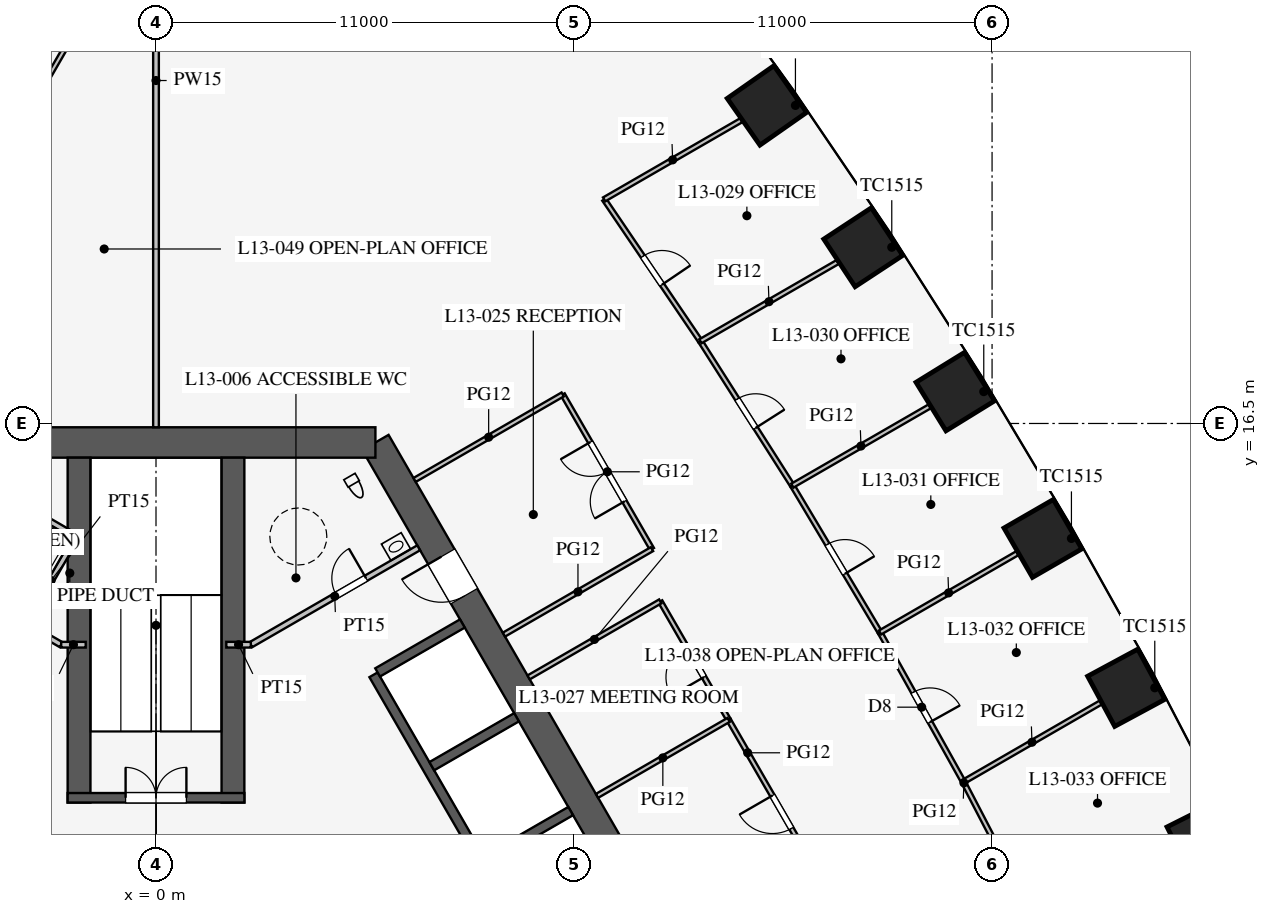
"""IFC4 building model, lengths in metres.
Left out: names, types, materials, properties, quantities, classifications, styles, units other than length and angle.
Written with IfcOpenShell. Run it as: python <this file> out.ifc"""

import sys

from ifc_helpers import new_model, si_unit, direction, frame, frame_2d, origin, origin_2d, place, context, subcontext, project, spatial, rectangle, extrude, element, fill, save


model = new_model("IFC4")
c1 = context("Model", 3, precision=1e-05, world=origin(), true_north=direction((0.0, 1.0)))
c2 = subcontext(c1, "Body", "Model", "MODEL_VIEW")
j1 = project(units=[si_unit("LENGTHUNIT", "METRE"), si_unit("PLANEANGLEUNIT", "RADIAN")], contexts=[c1])
p1 = place(None, origin())
s1 = spatial("IfcSite", under=j1, at=p1, CompositionType="ELEMENT")
p2 = place(p1, origin())
s2 = spatial("IfcBuilding", under=s1, at=p2, CompositionType="ELEMENT")
p3 = place(p2, frame((0.0, 0.0, 58.5)))
s3 = spatial("IfcBuildingStorey", under=s2, at=p3, CompositionType="ELEMENT", Elevation=58.5)
for number, where, z_axis, x_axis in (
    (1, (27.611, 5.549, 0.0), (0.0, 0.0, 1.0), (-0.449, 0.894, 0.0)),
    (2, (25.531, 9.544, 0.0), (0.0, 0.0, 1.0), (-0.475, 0.88, 0.0)),
    (3, (23.338, 13.474, 0.0), (0.0, 0.0, 1.0), (-0.5, 0.866, 0.0)),
    (4, (21.031, 17.339, 0.0), (0.0, 0.0, 1.0), (-0.525, 0.851, 0.0)),
    (5, (18.611, 21.137, 0.0), (0.0, 0.0, 1.0), (-0.549, 0.836, 0.0)),
    (6, (16.076, 24.87, 0.0), (0.0, 0.0, 1.0), (-0.574, 0.819, 0.0)),
):
    element("IfcColumn", number, at=place(p3, frame(where, z_axis=z_axis, x_axis=x_axis)), inside=s3, PredefinedType="COLUMN", context=c2, shape_type="SweptSolid", body=[
        extrude(rectangle(XDim=1.5, YDim=1.5, at=origin_2d()), origin(), (0.0, 0.0, 1.0), 4.2),
    ])
p4 = place(p3, frame((16.743, -3.0, 0.0), z_axis=(0.0, 0.0, 1.0), x_axis=(-0.500002442456, 0.866023993627, 0.0)))
e7 = element("IfcWall", 7, at=p4, inside=s3, PredefinedType="SHEAR", context=c2, shape_type="SweptSolid", body=[
    extrude(rectangle(XDim=21.939, YDim=0.8, at=frame_2d((10.97, 0.0))), origin(), (0.0, 0.0, 1.0), 4.2),
])
p5 = place(p4, frame((17.27, 0.0, 0.0)))
e8 = element("IfcOpeningElement", 8, at=p5, cuts=e7, PredefinedType="OPENING", context=c2, shape_type="SweptSolid", body=[
    extrude(rectangle(XDim=1.2, YDim=2.1, at=frame_2d((0.6, 1.05))), frame((0.0, 0.41, 0.0), z_axis=(0.0, -1.0, 0.0), x_axis=(1.0, 0.0, 0.0)), (0.0, 0.0, 1.0), 0.82),
])
p6 = place(p4, frame((3.47, 0.0, 0.0)))
e9 = element("IfcOpeningElement", 9, at=p6, cuts=e7, PredefinedType="OPENING", context=c2, shape_type="SweptSolid", body=[
    extrude(rectangle(XDim=1.2, YDim=2.1, at=frame_2d((0.6, 1.05))), frame((0.0, 0.41, 0.0), z_axis=(0.0, -1.0, 0.0), x_axis=(1.0, 0.0, 0.0)), (0.0, 0.0, 1.0), 0.82),
])
p7 = place(p3, frame((5.773, 16.0, 0.0), z_axis=(0.0, 0.0, 1.0), x_axis=(-1.0, 0.0, 0.0)))
e10 = element("IfcWall", 10, at=p7, inside=s3, PredefinedType="SHEAR", context=c2, shape_type="SweptSolid", body=[
    extrude(rectangle(XDim=11.547, YDim=0.8, at=frame_2d((5.773, 0.0))), origin(), (0.0, 0.0, 1.0), 4.2),
])
p8 = place(p3, frame((11.424, 0.014, 0.0), z_axis=(0.0, 0.0, 1.0), x_axis=(-0.500001763848, 0.866024385424, 0.0)))
e11 = element("IfcWall", 11, at=p8, inside=s3, PredefinedType="SHEAR", context=c2, shape_type="SweptSolid", body=[
    extrude(rectangle(XDim=11.4, YDim=0.25, at=frame_2d((5.7, 0.0))), origin(), (0.0, 0.0, 1.0), 4.2),
])
for number, where, z_axis, x_axis in (
    (12, (8.682, 5.012, 0.0), (0.0, 0.0, 1.0), (0.866, 0.5, 0.0)),
    (13, (7.257, 7.481, 0.0), (0.0, 0.0, 1.0), (0.866, 0.5, 0.0)),
):
    element("IfcWall", number, at=place(p3, frame(where, z_axis=z_axis, x_axis=x_axis)), inside=s3, PredefinedType="SHEAR", context=c2, shape_type="SweptSolid", body=[
        extrude(rectangle(XDim=2.575, YDim=0.25, at=frame_2d((1.288, 0.0))), origin(), (0.0, 0.0, 1.0), 4.2),
    ])
p9 = place(p3, frame((5.832, 9.949, 0.0), z_axis=(0.0, 0.0, 1.0), x_axis=(0.866029291668, 0.499993265928, 0.0)))
e14 = element("IfcWall", 14, at=p9, inside=s3, PredefinedType="SHEAR", context=c2, shape_type="SweptSolid", body=[
    extrude(rectangle(XDim=2.575, YDim=0.25, at=frame_2d((1.288, 0.0))), origin(), (0.0, 0.0, 1.0), 4.2),
])
for number, where, z_axis, x_axis in (
    (15, (2.025, 6.525, 0.0), (0.0, 0.0, 1.0), (0.0, 1.0, 0.0)),
    (16, (-2.025, 6.525, 0.0), (0.0, 0.0, 1.0), (0.0, 1.0, 0.0)),
):
    element("IfcWall", number, at=place(p3, frame(where, z_axis=z_axis, x_axis=x_axis)), inside=s3, PredefinedType="SHEAR", context=c2, shape_type="SweptSolid", body=[
        extrude(rectangle(XDim=9.075, YDim=0.6, at=frame_2d((4.538, 0.0))), origin(), (0.0, 0.0, 1.0), 4.2),
    ])
p10 = place(p3, frame((2.325, 6.65, 0.0), z_axis=(0.0, 0.0, 1.0), x_axis=(-1.0, 0.0, 0.0)))
e17 = element("IfcWall", 17, at=p10, inside=s3, PredefinedType="SHEAR", context=c2, shape_type="SweptSolid", body=[
    extrude(rectangle(XDim=4.65, YDim=0.25, at=frame_2d((2.325, 0.0))), origin(), (0.0, 0.0, 1.0), 4.2),
])
p11 = place(p10, frame((1.525, 0.0, 0.0)))
e18 = element("IfcOpeningElement", 18, at=p11, cuts=e17, PredefinedType="OPENING", context=c2, shape_type="SweptSolid", body=[
    extrude(rectangle(XDim=1.6, YDim=2.1, at=frame_2d((0.8, 1.05))), frame((0.0, 0.135, 0.0), z_axis=(0.0, -1.0, 0.0), x_axis=(1.0, 0.0, 0.0)), (0.0, 0.0, 1.0), 0.27),
])
p12 = place(p3, frame((2.495, 10.678, 0.0), z_axis=(0.0, 0.0, 1.0), x_axis=(0.86602216432, 0.500005610874, 0.0)))
e19 = element("IfcWall", 19, at=p12, inside=s3, PredefinedType="PARTITIONING", context=c2, shape_type="SweptSolid", body=[
    extrude(rectangle(XDim=5.1, YDim=0.15, at=frame_2d((2.55, 0.0))), origin(), (0.0, 0.0, 1.0), 4.0),
])
p13 = place(p12, frame((2.6, 0.0, 0.0)))
e20 = element("IfcOpeningElement", 20, at=p13, cuts=e19, PredefinedType="OPENING", context=c2, shape_type="SweptSolid", body=[
    extrude(rectangle(XDim=0.9, YDim=2.1, at=frame_2d((0.45, 1.05))), frame((0.0, 0.085, 0.0), z_axis=(0.0, -1.0, 0.0), x_axis=(1.0, 0.0, 0.0)), (0.0, 0.0, 1.0), 0.17),
])
p14 = place(p3, frame((-2.495, 10.678, 0.0), z_axis=(0.0, 0.0, 1.0), x_axis=(-0.86602216432, 0.500005610874, 0.0)))
e21 = element("IfcWall", 21, at=p14, inside=s3, PredefinedType="PARTITIONING", context=c2, shape_type="SweptSolid", body=[
    extrude(rectangle(XDim=5.1, YDim=0.15, at=frame_2d((2.55, 0.0))), origin(), (0.0, 0.0, 1.0), 4.0),
])
p15 = place(p14, frame((2.6, 0.0, 0.0)))
e22 = element("IfcOpeningElement", 22, at=p15, cuts=e21, PredefinedType="OPENING", context=c2, shape_type="SweptSolid", body=[
    extrude(rectangle(XDim=0.9, YDim=2.1, at=frame_2d((0.45, 1.05))), frame((0.0, 0.085, 0.0), z_axis=(0.0, -1.0, 0.0), x_axis=(1.0, 0.0, 0.0)), (0.0, 0.0, 1.0), 0.17),
])
for number, where, z_axis, x_axis in (
    (23, (2.495, 10.678, 0.0), (0.0, 0.0, 1.0), (-1.0, 0.0, 0.0)),
    (24, (-2.495, 10.678, 0.0), (0.0, 0.0, 1.0), (1.0, 0.0, 0.0)),
):
    element("IfcWall", number, at=place(p3, frame(where, z_axis=z_axis, x_axis=x_axis)), inside=s3, PredefinedType="PARTITIONING", context=c2, shape_type="SweptSolid", body=[
        extrude(rectangle(XDim=0.645, YDim=0.15, at=frame_2d((0.323, 0.0))), origin(), (0.0, 0.0, 1.0), 4.0),
    ])
p16 = place(p3, frame((-2.031, 13.482, 0.0), z_axis=(0.0, 0.0, 1.0), x_axis=(-0.866050731258, 0.499956128963, 0.0)))
e25 = element("IfcWall", 25, at=p16, inside=s3, PredefinedType="PARTITIONING", context=c2, shape_type="SweptSolid", body=[
    extrude(rectangle(XDim=4.1, YDim=0.15, at=frame_2d((2.05, 0.0))), origin(), (0.0, 0.0, 1.0), 4.0),
])
p17 = place(p3, frame((-3.389, 11.281, 0.0), z_axis=(0.0, 0.0, 1.0), x_axis=(0.499989096993, 0.866031698547, 0.0)))
e26 = element("IfcWall", 26, at=p17, inside=s3, PredefinedType="PARTITIONING", context=c2, shape_type="SweptSolid", body=[
    extrude(rectangle(XDim=2.51, YDim=0.15, at=frame_2d((1.255, 0.0))), origin(), (0.0, 0.0, 1.0), 4.0),
])
p18 = place(p3, frame((0.0, 16.4, 0.0), z_axis=(0.0, 0.0, 1.0), x_axis=(0.0, 1.0, 0.0)))
e27 = element("IfcWall", 27, at=p18, inside=s3, PredefinedType="PARTITIONING", context=c2, shape_type="SweptSolid", body=[
    extrude(rectangle(XDim=18.25, YDim=0.15, at=frame_2d((9.125, 0.0))), origin(), (0.0, 0.0, 1.0), 2.3),
])
p19 = place(p3, frame((13.052, 13.194, 0.0), z_axis=(0.0, 0.0, 1.0), x_axis=(-0.499977259774, 0.866038532462, 0.0)))
e28 = element("IfcWall", 28, at=p19, inside=s3, PredefinedType="PARTITIONING", context=c2, shape_type="SweptSolid", body=[
    extrude(rectangle(XDim=4.7, YDim=0.12, at=frame_2d((2.35, 0.0))), origin(), (0.0, 0.0, 1.0), 2.9),
])
p20 = place(p19, frame((1.45, 0.0, 0.15)))
e29 = element("IfcOpeningElement", 29, at=p20, cuts=e28, PredefinedType="OPENING", context=c2, shape_type="SweptSolid", body=[
    extrude(rectangle(XDim=1.8, YDim=2.1, at=frame_2d((0.9, 1.05))), frame((0.0, 0.07, 0.0), z_axis=(0.0, -1.0, 0.0), x_axis=(1.0, 0.0, 0.0)), (0.0, 0.0, 1.0), 0.14),
])
p21 = place(p3, frame((15.069, 8.7, 0.0), z_axis=(0.0, 0.0, 1.0), x_axis=(-0.500012057535, 0.866018442252, 0.0)))
e30 = element("IfcWall", 30, at=p21, inside=s3, PredefinedType="PARTITIONING", context=c2, shape_type="SweptSolid", body=[
    extrude(rectangle(XDim=3.6, YDim=0.12, at=frame_2d((1.8, 0.0))), origin(), (0.0, 0.0, 1.0), 2.9),
])
p22 = place(p21, frame((1.3, 0.0, 0.15)))
e31 = element("IfcOpeningElement", 31, at=p22, cuts=e30, PredefinedType="OPENING", context=c2, shape_type="SweptSolid", body=[
    extrude(rectangle(XDim=1.0, YDim=2.1, at=frame_2d((0.5, 1.05))), frame((0.0, 0.07, 0.0), z_axis=(0.0, -1.0, 0.0), x_axis=(1.0, 0.0, 0.0)), (0.0, 0.0, 1.0), 0.14),
])
p23 = place(p3, frame((17.869, 3.85, 0.0), z_axis=(0.0, 0.0, 1.0), x_axis=(-0.500016814911, 0.866015695474, 0.0)))
e32 = element("IfcWall", 32, at=p23, inside=s3, PredefinedType="PARTITIONING", context=c2, shape_type="SweptSolid", body=[
    extrude(rectangle(XDim=5.6, YDim=0.12, at=frame_2d((2.8, 0.0))), origin(), (0.0, 0.0, 1.0), 2.9),
])
p24 = place(p23, frame((2.3, 0.0, 0.15)))
e33 = element("IfcOpeningElement", 33, at=p24, cuts=e32, PredefinedType="OPENING", context=c2, shape_type="SweptSolid", body=[
    extrude(rectangle(XDim=1.0, YDim=2.1, at=frame_2d((0.5, 1.05))), frame((0.0, 0.07, 0.0), z_axis=(0.0, -1.0, 0.0), x_axis=(1.0, 0.0, 0.0)), (0.0, 0.0, 1.0), 0.14),
])
p25 = place(p3, frame((9.805, 9.818, 0.0), z_axis=(0.0, 0.0, 1.0), x_axis=(0.866026010844, 0.49999894854, 0.0)))
e34 = element("IfcWall", 34, at=p25, inside=s3, PredefinedType="PARTITIONING", context=c2, shape_type="SweptSolid", body=[
    extrude(rectangle(XDim=4.0, YDim=0.12, at=frame_2d((2.0, 0.0))), origin(), (0.0, 0.0, 1.0), 2.9),
])
p26 = place(p3, frame((9.155, 10.944, 0.0), z_axis=(0.0, 0.0, 1.0), x_axis=(0.866017533419, 0.500013631625, 0.0)))
e35 = element("IfcWall", 35, at=p26, inside=s3, PredefinedType="PARTITIONING", context=c2, shape_type="SweptSolid", body=[
    extrude(rectangle(XDim=4.5, YDim=0.12, at=frame_2d((2.25, 0.0))), origin(), (0.0, 0.0, 1.0), 2.9),
])
p27 = place(p3, frame((6.805, 15.014, 0.0), z_axis=(0.0, 0.0, 1.0), x_axis=(0.866031096941, 0.499990139034, 0.0)))
e36 = element("IfcWall", 36, at=p27, inside=s3, PredefinedType="PARTITIONING", context=c2, shape_type="SweptSolid", body=[
    extrude(rectangle(XDim=4.5, YDim=0.12, at=frame_2d((2.25, 0.0))), origin(), (0.0, 0.0, 1.0), 2.9),
])
p28 = place(p3, frame((11.605, 6.7, 0.0), z_axis=(0.0, 0.0, 1.0), x_axis=(0.866026010844, 0.49999894854, 0.0)))
e37 = element("IfcWall", 37, at=p28, inside=s3, PredefinedType="PARTITIONING", context=c2, shape_type="SweptSolid", body=[
    extrude(rectangle(XDim=4.0, YDim=0.12, at=frame_2d((2.0, 0.0))), origin(), (0.0, 0.0, 1.0), 2.8),
])
p29 = place(p3, frame((19.052, 10.999, 0.0), z_axis=(0.0, 0.0, 1.0), x_axis=(-0.51252396108, 0.858672923364, 0.0)))
e38 = element("IfcWall", 38, at=p29, inside=s3, PredefinedType="PARTITIONING", context=c2, shape_type="SweptSolid", body=[
    extrude(rectangle(XDim=4.5, YDim=0.12, at=frame_2d((2.25, 0.0))), origin(), (0.0, 0.0, 1.0), 2.9),
])
p30 = place(p29, frame((1.8, 0.0, 0.15)))
e39 = element("IfcOpeningElement", 39, at=p30, cuts=e38, PredefinedType="OPENING", context=c2, shape_type="SweptSolid", body=[
    extrude(rectangle(XDim=0.9, YDim=2.1, at=frame_2d((0.45, 1.05))), frame((0.0, 0.07, 0.0), z_axis=(0.0, -1.0, 0.0), x_axis=(1.0, 0.0, 0.0)), (0.0, 0.0, 1.0), 0.14),
])
p31 = place(p3, frame((16.745, 14.864, 0.0), z_axis=(0.0, 0.0, 1.0), x_axis=(-0.537205132487, 0.843451626135, 0.0)))
e40 = element("IfcWall", 40, at=p31, inside=s3, PredefinedType="PARTITIONING", context=c2, shape_type="SweptSolid", body=[
    extrude(rectangle(XDim=4.504, YDim=0.12, at=frame_2d((2.252, 0.0))), origin(), (0.0, 0.0, 1.0), 2.9),
])
p32 = place(p31, frame((1.8, 0.0, 0.15)))
e41 = element("IfcOpeningElement", 41, at=p32, cuts=e40, PredefinedType="OPENING", context=c2, shape_type="SweptSolid", body=[
    extrude(rectangle(XDim=0.9, YDim=2.1, at=frame_2d((0.45, 1.05))), frame((0.0, 0.07, 0.0), z_axis=(0.0, -1.0, 0.0), x_axis=(1.0, 0.0, 0.0)), (0.0, 0.0, 1.0), 0.14),
])
p33 = place(p3, frame((14.325, 18.663, 0.0), z_axis=(0.0, 0.0, 1.0), x_axis=(-0.561512004239, 0.827468591002, 0.0)))
e42 = element("IfcWall", 42, at=p33, inside=s3, PredefinedType="PARTITIONING", context=c2, shape_type="SweptSolid", body=[
    extrude(rectangle(XDim=4.512, YDim=0.12, at=frame_2d((2.256, 0.0))), origin(), (0.0, 0.0, 1.0), 2.9),
])
p34 = place(p33, frame((1.8, 0.0, 0.15)))
e43 = element("IfcOpeningElement", 43, at=p34, cuts=e42, PredefinedType="OPENING", context=c2, shape_type="SweptSolid", body=[
    extrude(rectangle(XDim=0.9, YDim=2.1, at=frame_2d((0.45, 1.05))), frame((0.0, 0.07, 0.0), z_axis=(0.0, -1.0, 0.0), x_axis=(1.0, 0.0, 0.0)), (0.0, 0.0, 1.0), 0.14),
])
p35 = place(p3, frame((21.245, 7.07, 0.0), z_axis=(0.0, 0.0, 1.0), x_axis=(-0.487373854787, 0.873193406795, 0.0)))
e44 = element("IfcWall", 44, at=p35, inside=s3, PredefinedType="PARTITIONING", context=c2, shape_type="SweptSolid", body=[
    extrude(rectangle(XDim=4.5, YDim=0.12, at=frame_2d((2.25, 0.0))), origin(), (0.0, 0.0, 1.0), 2.9),
])
p36 = place(p35, frame((1.8, 0.0, 0.15)))
e45 = element("IfcOpeningElement", 45, at=p36, cuts=e44, PredefinedType="OPENING", context=c2, shape_type="SweptSolid", body=[
    extrude(rectangle(XDim=0.9, YDim=2.1, at=frame_2d((0.45, 1.05))), frame((0.0, 0.07, 0.0), z_axis=(0.0, -1.0, 0.0), x_axis=(1.0, 0.0, 0.0)), (0.0, 0.0, 1.0), 0.14),
])
p37 = place(p3, frame((23.325, 3.074, 0.0), z_axis=(0.0, 0.0, 1.0), x_axis=(-0.461852697957, 0.886956642339, 0.0)))
e46 = element("IfcWall", 46, at=p37, inside=s3, PredefinedType="PARTITIONING", context=c2, shape_type="SweptSolid", body=[
    extrude(rectangle(XDim=4.504, YDim=0.12, at=frame_2d((2.252, 0.0))), origin(), (0.0, 0.0, 1.0), 2.9),
])
p38 = place(p37, frame((1.8, 0.0, 0.15)))
e47 = element("IfcOpeningElement", 47, at=p38, cuts=e46, PredefinedType="OPENING", context=c2, shape_type="SweptSolid", body=[
    extrude(rectangle(XDim=0.9, YDim=2.1, at=frame_2d((0.45, 1.05))), frame((0.0, 0.07, 0.0), z_axis=(0.0, -1.0, 0.0), x_axis=(1.0, 0.0, 0.0)), (0.0, 0.0, 1.0), 0.14),
])
p39 = place(p3, frame((19.052, 10.999, 0.0), z_axis=(0.0, 0.0, 1.0), x_axis=(0.866004239599, 0.500036655653, 0.0)))
e48 = element("IfcWall", 48, at=p39, inside=s3, PredefinedType="PARTITIONING", context=c2, shape_type="SweptSolid", body=[
    extrude(rectangle(XDim=4.17, YDim=0.12, at=frame_2d((2.085, 0.0))), origin(), (0.0, 0.0, 1.0), 2.8),
])
p40 = place(p3, frame((11.792, 22.396, 0.0), z_axis=(0.0, 0.0, 1.0), x_axis=(0.866011781705, 0.500023593391, 0.0)))
e49 = element("IfcWall", 49, at=p40, inside=s3, PredefinedType="PARTITIONING", context=c2, shape_type="SweptSolid", body=[
    extrude(rectangle(XDim=4.164, YDim=0.12, at=frame_2d((2.082, 0.0))), origin(), (0.0, 0.0, 1.0), 2.6),
])
p41 = place(p3, frame((16.745, 14.864, 0.0), z_axis=(0.0, 0.0, 1.0), x_axis=(0.866025669538, 0.499999539701, 0.0)))
e50 = element("IfcWall", 50, at=p41, inside=s3, PredefinedType="PARTITIONING", context=c2, shape_type="SweptSolid", body=[
    extrude(rectangle(XDim=4.169, YDim=0.12, at=frame_2d((2.085, 0.0))), origin(), (0.0, 0.0, 1.0), 2.8),
])
p42 = place(p3, frame((14.325, 18.663, 0.0), z_axis=(0.0, 0.0, 1.0), x_axis=(0.866009971343, 0.50002672882, 0.0)))
e51 = element("IfcWall", 51, at=p42, inside=s3, PredefinedType="PARTITIONING", context=c2, shape_type="SweptSolid", body=[
    extrude(rectangle(XDim=4.167, YDim=0.12, at=frame_2d((2.083, 0.0))), origin(), (0.0, 0.0, 1.0), 2.8),
])
p43 = place(p3, frame((21.245, 7.07, 0.0), z_axis=(0.0, 0.0, 1.0), x_axis=(0.866025669538, 0.499999539701, 0.0)))
e52 = element("IfcWall", 52, at=p43, inside=s3, PredefinedType="PARTITIONING", context=c2, shape_type="SweptSolid", body=[
    extrude(rectangle(XDim=4.169, YDim=0.12, at=frame_2d((2.085, 0.0))), origin(), (0.0, 0.0, 1.0), 2.8),
])
p44 = place(p3, frame((-0.016, 30.491, 0.0), z_axis=(0.0, 0.0, 1.0), x_axis=(-0.50000091641, -0.866024874695, 0.0)))
e53 = element("IfcWall", 53, at=p44, inside=s3, PredefinedType="PARTITIONING", context=c2, shape_type="SweptSolid", body=[
    extrude(rectangle(XDim=52.796, YDim=0.12, at=frame_2d((26.398, 0.0))), origin(), (0.0, 0.0, 1.0), 2.9),
])
p45 = place(p44, frame((10.2, 0.0, 0.15)))
e54 = element("IfcOpeningElement", 54, at=p45, cuts=e53, PredefinedType="OPENING", context=c2, shape_type="SweptSolid", body=[
    extrude(rectangle(XDim=1.8, YDim=2.1, at=frame_2d((0.9, 1.05))), frame((0.0, 0.07, 0.0), z_axis=(0.0, -1.0, 0.0), x_axis=(1.0, 0.0, 0.0)), (0.0, 0.0, 1.0), 0.14),
])
p46 = place(p44, frame((40.8, 0.0, 0.15)))
e55 = element("IfcOpeningElement", 55, at=p46, cuts=e53, PredefinedType="OPENING", context=c2, shape_type="SweptSolid", body=[
    extrude(rectangle(XDim=1.8, YDim=2.1, at=frame_2d((0.9, 1.05))), frame((0.0, 0.07, 0.0), z_axis=(0.0, -1.0, 0.0), x_axis=(1.0, 0.0, 0.0)), (0.0, 0.0, 1.0), 0.14),
])
p47 = place(p13, origin())
e56 = element("IfcDoor", 56, at=p47, inside=s3, OperationType="SINGLE_SWING_RIGHT", PredefinedType="DOOR", context=c2, shape_type="SweptSolid", body=[
    extrude(rectangle(XDim=0.9, YDim=2.1, at=frame_2d((0.45, 1.05))), frame((0.0, 0.025, 0.0), z_axis=(0.0, -1.0, 0.0), x_axis=(1.0, 0.0, 0.0)), (0.0, 0.0, 1.0), 0.05),
])
fill(e20, e56)
p48 = place(p11, frame((1.6, 0.0, 0.0), z_axis=(0.0, 0.0, 1.0), x_axis=(-1.0, 0.0, 0.0)))
e57 = element("IfcDoor", 57, at=p48, inside=s3, OperationType="DOUBLE_DOOR_SINGLE_SWING", PredefinedType="DOOR", context=c2, shape_type="SweptSolid", body=[
    extrude(rectangle(XDim=1.6, YDim=2.1, at=frame_2d((0.8, 1.05))), frame((0.0, 0.025, 0.0), z_axis=(0.0, -1.0, 0.0), x_axis=(1.0, 0.0, 0.0)), (0.0, 0.0, 1.0), 0.05),
])
fill(e18, e57)
p49 = place(p5, origin())
e58 = element("IfcDoor", 58, at=p49, inside=s3, OperationType="SINGLE_SWING_RIGHT", PredefinedType="DOOR", context=c2, shape_type="SweptSolid", body=[
    extrude(rectangle(XDim=1.2, YDim=2.1, at=frame_2d((0.6, 1.05))), frame((0.0, 0.025, 0.0), z_axis=(0.0, -1.0, 0.0), x_axis=(1.0, 0.0, 0.0)), (0.0, 0.0, 1.0), 0.05),
])
fill(e8, e58)
p50 = place(p20, origin())
e59 = element("IfcDoor", 59, at=p50, inside=s3, OperationType="DOUBLE_DOOR_SINGLE_SWING", PredefinedType="DOOR", context=c2, shape_type="SweptSolid", body=[
    extrude(rectangle(XDim=1.8, YDim=2.1, at=frame_2d((0.9, 1.05))), frame((0.0, 0.025, 0.0), z_axis=(0.0, -1.0, 0.0), x_axis=(1.0, 0.0, 0.0)), (0.0, 0.0, 1.0), 0.05),
])
fill(e29, e59)
p51 = place(p24, origin())
e60 = element("IfcDoor", 60, at=p51, inside=s3, OperationType="SINGLE_SWING_RIGHT", PredefinedType="DOOR", context=c2, shape_type="SweptSolid", body=[
    extrude(rectangle(XDim=1.0, YDim=2.1, at=frame_2d((0.5, 1.05))), frame((0.0, 0.025, 0.0), z_axis=(0.0, -1.0, 0.0), x_axis=(1.0, 0.0, 0.0)), (0.0, 0.0, 1.0), 0.05),
])
fill(e33, e60)
p52 = place(p22, origin())
e61 = element("IfcDoor", 61, at=p52, inside=s3, OperationType="SINGLE_SWING_LEFT", PredefinedType="DOOR", context=c2, shape_type="SweptSolid", body=[
    extrude(rectangle(XDim=1.0, YDim=2.1, at=frame_2d((0.5, 1.05))), frame((0.0, 0.025, 0.0), z_axis=(0.0, -1.0, 0.0), x_axis=(1.0, 0.0, 0.0)), (0.0, 0.0, 1.0), 0.05),
])
fill(e31, e61)
p53 = place(p34, frame((0.9, 0.0, 0.0), z_axis=(0.0, 0.0, 1.0), x_axis=(-1.0, 0.0, 0.0)))
e62 = element("IfcDoor", 62, at=p53, inside=s3, OperationType="SINGLE_SWING_RIGHT", PredefinedType="DOOR", context=c2, shape_type="SweptSolid", body=[
    extrude(rectangle(XDim=0.9, YDim=2.1, at=frame_2d((0.45, 1.05))), frame((0.0, 0.025, 0.0), z_axis=(0.0, -1.0, 0.0), x_axis=(1.0, 0.0, 0.0)), (0.0, 0.0, 1.0), 0.05),
])
fill(e43, e62)
p54 = place(p32, frame((0.9, 0.0, 0.0), z_axis=(0.0, 0.0, 1.0), x_axis=(-1.0, 0.0, 0.0)))
e63 = element("IfcDoor", 63, at=p54, inside=s3, OperationType="SINGLE_SWING_RIGHT", PredefinedType="DOOR", context=c2, shape_type="SweptSolid", body=[
    extrude(rectangle(XDim=0.9, YDim=2.1, at=frame_2d((0.45, 1.05))), frame((0.0, 0.025, 0.0), z_axis=(0.0, -1.0, 0.0), x_axis=(1.0, 0.0, 0.0)), (0.0, 0.0, 1.0), 0.05),
])
fill(e41, e63)
p55 = place(p30, frame((0.9, 0.0, 0.0), z_axis=(0.0, 0.0, 1.0), x_axis=(-1.0, 0.0, 0.0)))
e64 = element("IfcDoor", 64, at=p55, inside=s3, OperationType="SINGLE_SWING_RIGHT", PredefinedType="DOOR", context=c2, shape_type="SweptSolid", body=[
    extrude(rectangle(XDim=0.9, YDim=2.1, at=frame_2d((0.45, 1.05))), frame((0.0, 0.025, 0.0), z_axis=(0.0, -1.0, 0.0), x_axis=(1.0, 0.0, 0.0)), (0.0, 0.0, 1.0), 0.05),
])
fill(e39, e64)
p56 = place(p36, frame((0.9, 0.0, 0.0), z_axis=(0.0, 0.0, 1.0), x_axis=(-1.0, 0.0, 0.0)))
e65 = element("IfcDoor", 65, at=p56, inside=s3, OperationType="SINGLE_SWING_RIGHT", PredefinedType="DOOR", context=c2, shape_type="SweptSolid", body=[
    extrude(rectangle(XDim=0.9, YDim=2.1, at=frame_2d((0.45, 1.05))), frame((0.0, 0.025, 0.0), z_axis=(0.0, -1.0, 0.0), x_axis=(1.0, 0.0, 0.0)), (0.0, 0.0, 1.0), 0.05),
])
fill(e45, e65)
save(model, sys.argv[1])
